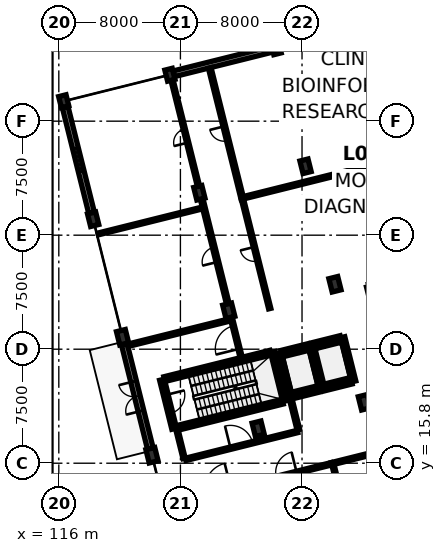
"""IFC4 building model, lengths in metres.
Left out: names, types, materials, properties, quantities, classifications, styles, units other than length and angle.
Written with IfcOpenShell. Run it as: python <this file> out.ifc"""

import sys

from ifc_helpers import new_model, si_unit, direction, frame, frame_2d, origin, origin_2d, place, context, subcontext, project, spatial, rectangle, extrude, element, fill, save


model = new_model("IFC4")
c1 = context("Model", 3, precision=1e-05, world=origin(), true_north=direction((0.0, 1.0)))
c2 = subcontext(c1, "Body", "Model", "MODEL_VIEW")
j1 = project(units=[si_unit("LENGTHUNIT", "METRE"), si_unit("PLANEANGLEUNIT", "RADIAN")], contexts=[c1])
p1 = place(None, origin())
s1 = spatial("IfcSite", under=j1, at=p1, CompositionType="ELEMENT")
p2 = place(p1, origin())
s2 = spatial("IfcBuilding", under=s1, at=p2, CompositionType="ELEMENT")
p3 = place(p2, origin())
s3 = spatial("IfcBuildingStorey", under=s2, at=p3, CompositionType="ELEMENT", Elevation=0.0)
for number, where, z_axis, x_axis in (
    (1, (122.129, 16.325, 0.0), (0.0, 0.0, 1.0), (0.97, 0.242, 0.0)),
    (2, (120.194, 24.087, 0.0), (0.0, 0.0, 1.0), (0.97, 0.242, 0.0)),
):
    element("IfcColumn", number, at=place(p3, frame(where, z_axis=z_axis, x_axis=x_axis)), inside=s3, PredefinedType="COLUMN", context=c2, shape_type="SweptSolid", body=[
        extrude(rectangle(XDim=0.6, YDim=0.9, at=origin_2d()), origin(), (0.0, 0.0, 1.0), 4.7),
    ])
p4 = place(p3, frame((118.259, 31.849, 0.0), z_axis=(0.0, 0.0, 1.0), x_axis=(0.970295726276, 0.2419218956, 0.0)))
e3 = element("IfcColumn", 3, at=p4, inside=s3, PredefinedType="COLUMN", context=c2, shape_type="SweptSolid", body=[
    extrude(rectangle(XDim=0.55, YDim=0.85, at=origin_2d()), origin(), (0.0, 0.0, 1.0), 4.7),
])
p5 = place(p3, frame((116.323, 39.612, 0.0), z_axis=(0.0, 0.0, 1.0), x_axis=(0.970295726276, 0.2419218956, 0.0)))
e4 = element("IfcColumn", 4, at=p5, inside=s3, PredefinedType="COLUMN", context=c2, shape_type="SweptSolid", body=[
    extrude(rectangle(XDim=0.5, YDim=0.75, at=origin_2d()), origin(), (0.0, 0.0, 1.0), 4.7),
])
for number, where, z_axis, x_axis in (
    (5, (129.115, 18.067, 0.0), (0.0, 0.0, 1.0), (0.97, 0.242, 0.0)),
    (6, (127.18, 25.829, 0.0), (0.0, 0.0, 1.0), (0.97, 0.242, 0.0)),
):
    element("IfcColumn", number, at=place(p3, frame(where, z_axis=z_axis, x_axis=x_axis)), inside=s3, PredefinedType="COLUMN", context=c2, shape_type="SweptSolid", body=[
        extrude(rectangle(XDim=0.6, YDim=0.9, at=origin_2d()), origin(), (0.0, 0.0, 1.0), 4.7),
    ])
p6 = place(p3, frame((125.245, 33.591, 0.0), z_axis=(0.0, 0.0, 1.0), x_axis=(0.970295726276, 0.2419218956, 0.0)))
e7 = element("IfcColumn", 7, at=p6, inside=s3, PredefinedType="COLUMN", context=c2, shape_type="SweptSolid", body=[
    extrude(rectangle(XDim=0.55, YDim=0.85, at=origin_2d()), origin(), (0.0, 0.0, 1.0), 4.7),
])
p7 = place(p3, frame((123.309, 41.354, 0.0), z_axis=(0.0, 0.0, 1.0), x_axis=(0.970295726276, 0.2419218956, 0.0)))
e8 = element("IfcColumn", 8, at=p7, inside=s3, PredefinedType="COLUMN", context=c2, shape_type="SweptSolid", body=[
    extrude(rectangle(XDim=0.5, YDim=0.75, at=origin_2d()), origin(), (0.0, 0.0, 1.0), 4.7),
])
for number, where, z_axis, x_axis in (
    (9, (136.102, 19.808, 0.0), (0.0, 0.0, 1.0), (0.97, 0.242, 0.0)),
    (10, (134.166, 27.571, 0.0), (0.0, 0.0, 1.0), (0.97, 0.242, 0.0)),
):
    element("IfcColumn", number, at=place(p3, frame(where, z_axis=z_axis, x_axis=x_axis)), inside=s3, PredefinedType="COLUMN", context=c2, shape_type="SweptSolid", body=[
        extrude(rectangle(XDim=0.6, YDim=0.9, at=origin_2d()), origin(), (0.0, 0.0, 1.0), 4.7),
    ])
p8 = place(p3, frame((132.231, 35.333, 0.0), z_axis=(0.0, 0.0, 1.0), x_axis=(0.970295726276, 0.2419218956, 0.0)))
e11 = element("IfcColumn", 11, at=p8, inside=s3, PredefinedType="COLUMN", context=c2, shape_type="SweptSolid", body=[
    extrude(rectangle(XDim=0.55, YDim=0.85, at=origin_2d()), origin(), (0.0, 0.0, 1.0), 4.7),
])
p9 = place(p3, frame((130.295, 43.095, 0.0), z_axis=(0.0, 0.0, 1.0), x_axis=(0.970295726276, 0.2419218956, 0.0)))
e12 = element("IfcColumn", 12, at=p9, inside=s3, PredefinedType="COLUMN", context=c2, shape_type="SweptSolid", body=[
    extrude(rectangle(XDim=0.5, YDim=0.75, at=origin_2d()), origin(), (0.0, 0.0, 1.0), 4.7),
])
p10 = place(p3, frame((122.02, 16.761, 0.0), z_axis=(0.0, 0.0, 1.0), x_axis=(-0.241912563448, 0.970298052995, 0.0)))
e13 = element("IfcWall", 13, at=p10, inside=s3, PredefinedType="SOLIDWALL", context=c2, shape_type="SweptSolid", body=[
    extrude(rectangle(XDim=7.1, YDim=0.38, at=frame_2d((3.55, 0.0))), origin(), (0.0, 0.0, 1.0), 3.985),
])
p11 = place(p10, frame((2.55, 0.0, 0.0)))
e14 = element("IfcOpeningElement", 14, at=p11, cuts=e13, PredefinedType="OPENING", context=c2, shape_type="SweptSolid", body=[
    extrude(rectangle(XDim=2.0, YDim=2.35, at=frame_2d((1.0, 1.175))), frame((0.0, 0.202, 0.0), z_axis=(0.0, -1.0, 0.0), x_axis=(1.0, 0.0, 0.0)), (0.0, 0.0, 1.0), 0.404),
])
p12 = place(p3, frame((118.156, 32.262, 0.0), z_axis=(0.0, 0.0, 1.0), x_axis=(-0.241929233735, 0.970293896644, 0.0)))
e15 = element("IfcWall", 15, at=p12, inside=s3, PredefinedType="SOLIDWALL", context=c2, shape_type="SweptSolid", body=[
    extrude(rectangle(XDim=7.2, YDim=0.38, at=frame_2d((3.6, 0.0))), origin(), (0.0, 0.0, 1.0), 3.985),
])
p13 = place(p12, frame((2.8, 0.0, 0.9)))
e16 = element("IfcOpeningElement", 16, at=p13, cuts=e15, PredefinedType="OPENING", context=c2, shape_type="SweptSolid", body=[
    extrude(rectangle(XDim=1.6, YDim=1.3, at=frame_2d((0.8, 0.65))), frame((0.0, 0.202, 0.0), z_axis=(0.0, -1.0, 0.0), x_axis=(1.0, 0.0, 0.0)), (0.0, 0.0, 1.0), 0.404),
])
p14 = place(p3, frame((123.552, 41.414, 0.0), z_axis=(0.0, 0.0, 1.0), x_axis=(0.970296633454, 0.241918257079, 0.0)))
e17 = element("IfcWall", 17, at=p14, inside=s3, PredefinedType="SOLIDWALL", context=c2, shape_type="SweptSolid", body=[
    extrude(rectangle(XDim=6.7, YDim=0.38, at=frame_2d((3.35, 0.0))), origin(), (0.0, 0.0, 1.0), 3.885),
])
p15 = place(p3, frame((123.75, 18.11, 0.0), z_axis=(0.0, 0.0, 1.0), x_axis=(0.970294108333, 0.241928384724, 0.0)))
e18 = element("IfcWall", 18, at=p15, inside=s3, PredefinedType="SHEAR", context=c2, shape_type="SweptSolid", body=[
    extrude(rectangle(XDim=7.19, YDim=0.32, at=frame_2d((3.595, 0.0))), origin(), (0.0, 0.0, 1.0), 4.7),
])
p16 = place(p3, frame((130.887, 19.889, 0.0), z_axis=(0.0, 0.0, 1.0), x_axis=(-0.241947258837, 0.970289402158, 0.0)))
e19 = element("IfcWall", 19, at=p16, inside=s3, PredefinedType="SHEAR", context=c2, shape_type="SweptSolid", body=[
    extrude(rectangle(XDim=3.32, YDim=0.32, at=frame_2d((1.66, 0.0))), origin(), (0.0, 0.0, 1.0), 4.7),
])
p17 = place(p3, frame((129.924, 23.071, 0.0), z_axis=(0.0, 0.0, 1.0), x_axis=(-0.970294108333, -0.241928384724, 0.0)))
e20 = element("IfcWall", 20, at=p17, inside=s3, PredefinedType="SHEAR", context=c2, shape_type="SweptSolid", body=[
    extrude(rectangle(XDim=7.19, YDim=0.32, at=frame_2d((3.595, 0.0))), origin(), (0.0, 0.0, 1.0), 4.7),
])
p18 = place(p3, frame((122.787, 21.292, 0.0), z_axis=(0.0, 0.0, 1.0), x_axis=(0.241860763027, -0.970310966293, 0.0)))
e21 = element("IfcWall", 21, at=p18, inside=s3, PredefinedType="SHEAR", context=c2, shape_type="SweptSolid", body=[
    extrude(rectangle(XDim=3.32, YDim=0.32, at=frame_2d((1.66, 0.0))), origin(), (0.0, 0.0, 1.0), 4.7),
])
p19 = place(p18, frame((1.035, 0.0, 0.0)))
e22 = element("IfcOpeningElement", 22, at=p19, cuts=e21, PredefinedType="OPENING", context=c2, shape_type="SweptSolid", body=[
    extrude(rectangle(XDim=1.25, YDim=2.2, at=frame_2d((0.625, 1.1))), frame((0.0, 0.172, 0.0), z_axis=(0.0, -1.0, 0.0), x_axis=(1.0, 0.0, 0.0)), (0.0, 0.0, 1.0), 0.344),
])
p20 = place(p3, frame((131.363, 20.176, 0.0), z_axis=(0.0, 0.0, 1.0), x_axis=(0.970284587517, 0.241966566341, 0.0)))
e23 = element("IfcWall", 23, at=p20, inside=s3, PredefinedType="SHEAR", context=c2, shape_type="SweptSolid", body=[
    extrude(rectangle(XDim=1.817, YDim=0.28, at=frame_2d((0.909, 0.0))), origin(), (0.0, 0.0, 1.0), 4.7),
])
p21 = place(p3, frame((133.267, 20.651, 0.0), z_axis=(0.0, 0.0, 1.0), x_axis=(-0.241921647353, 0.970295788171, 0.0)))
e24 = element("IfcWall", 24, at=p21, inside=s3, PredefinedType="SHEAR", context=c2, shape_type="SweptSolid", body=[
    extrude(rectangle(XDim=2.994, YDim=0.28, at=frame_2d((1.497, 0.0))), origin(), (0.0, 0.0, 1.0), 4.7),
])
p22 = place(p3, frame((132.402, 23.521, 0.0), z_axis=(0.0, 0.0, 1.0), x_axis=(-0.970284587517, -0.241966566341, 0.0)))
e25 = element("IfcWall", 25, at=p22, inside=s3, PredefinedType="SHEAR", context=c2, shape_type="SweptSolid", body=[
    extrude(rectangle(XDim=1.817, YDim=0.28, at=frame_2d((0.909, 0.0))), origin(), (0.0, 0.0, 1.0), 4.7),
])
p23 = place(p22, frame((0.259, 0.0, 0.0)))
e26 = element("IfcOpeningElement", 26, at=p23, cuts=e25, PredefinedType="OPENING", context=c2, shape_type="SweptSolid", body=[
    extrude(rectangle(XDim=1.3, YDim=2.2, at=frame_2d((0.65, 1.1))), frame((0.0, 0.152, 0.0), z_axis=(0.0, -1.0, 0.0), x_axis=(1.0, 0.0, 0.0)), (0.0, 0.0, 1.0), 0.304),
])
p24 = place(p3, frame((130.498, 23.046, 0.0), z_axis=(0.0, 0.0, 1.0), x_axis=(0.241921647353, -0.970295788171, 0.0)))
e27 = element("IfcWall", 27, at=p24, inside=s3, PredefinedType="SHEAR", context=c2, shape_type="SweptSolid", body=[
    extrude(rectangle(XDim=2.994, YDim=0.28, at=frame_2d((1.497, 0.0))), origin(), (0.0, 0.0, 1.0), 4.7),
])
p25 = place(p3, frame((133.408, 20.686, 0.0), z_axis=(0.0, 0.0, 1.0), x_axis=(0.970285190026, 0.241964150272, 0.0)))
e28 = element("IfcWall", 28, at=p25, inside=s3, PredefinedType="SHEAR", context=c2, shape_type="SweptSolid", body=[
    extrude(rectangle(XDim=1.91, YDim=0.28, at=frame_2d((0.955, 0.0))), origin(), (0.0, 0.0, 1.0), 4.7),
])
p26 = place(p3, frame((135.402, 21.183, 0.0), z_axis=(0.0, 0.0, 1.0), x_axis=(-0.241921647353, 0.970295788171, 0.0)))
e29 = element("IfcWall", 29, at=p26, inside=s3, PredefinedType="SHEAR", context=c2, shape_type="SweptSolid", body=[
    extrude(rectangle(XDim=2.994, YDim=0.28, at=frame_2d((1.497, 0.0))), origin(), (0.0, 0.0, 1.0), 4.7),
])
p27 = place(p3, frame((134.537, 24.053, 0.0), z_axis=(0.0, 0.0, 1.0), x_axis=(-0.970285190026, -0.241964150272, 0.0)))
e30 = element("IfcWall", 30, at=p27, inside=s3, PredefinedType="SHEAR", context=c2, shape_type="SweptSolid", body=[
    extrude(rectangle(XDim=1.91, YDim=0.28, at=frame_2d((0.955, 0.0))), origin(), (0.0, 0.0, 1.0), 4.7),
])
p28 = place(p27, frame((0.305, 0.0, 0.0)))
e31 = element("IfcOpeningElement", 31, at=p28, cuts=e30, PredefinedType="OPENING", context=c2, shape_type="SweptSolid", body=[
    extrude(rectangle(XDim=1.3, YDim=2.2, at=frame_2d((0.65, 1.1))), frame((0.0, 0.152, 0.0), z_axis=(0.0, -1.0, 0.0), x_axis=(1.0, 0.0, 0.0)), (0.0, 0.0, 1.0), 0.304),
])
p29 = place(p3, frame((124.346, 16.053, 0.0), z_axis=(0.0, 0.0, 1.0), x_axis=(0.970295772287, 0.241921711059, 0.0)))
e32 = element("IfcWall", 32, at=p29, inside=s3, PredefinedType="PARTITIONING", context=c2, shape_type="SweptSolid", body=[
    extrude(rectangle(XDim=7.58, YDim=0.16, at=frame_2d((3.79, 0.0))), origin(), (0.0, 0.0, 1.0), 3.885),
])
p30 = place(p29, frame((3.04, 0.0, 0.0)))
e33 = element("IfcOpeningElement", 33, at=p30, cuts=e32, PredefinedType="OPENING", context=c2, shape_type="SweptSolid", body=[
    extrude(rectangle(XDim=1.5, YDim=2.28, at=frame_2d((0.75, 1.14))), frame((0.0, 0.092, 0.0), z_axis=(0.0, -1.0, 0.0), x_axis=(1.0, 0.0, 0.0)), (0.0, 0.0, 1.0), 0.184),
])
p31 = place(p3, frame((127.995, 22.767, 0.0), z_axis=(0.0, 0.0, 1.0), x_axis=(-0.241877500256, 0.9703067942, 0.0)))
e34 = element("IfcWall", 34, at=p31, inside=s3, PredefinedType="PARTITIONING", context=c2, shape_type="SweptSolid", body=[
    extrude(rectangle(XDim=2.706, YDim=0.15, at=frame_2d((1.353, 0.0))), origin(), (0.0, 0.0, 1.0), 4.7),
])
p32 = place(p31, frame((0.573, 0.0, 0.0)))
e35 = element("IfcOpeningElement", 35, at=p32, cuts=e34, PredefinedType="OPENING", context=c2, shape_type="SweptSolid", body=[
    extrude(rectangle(XDim=1.56, YDim=2.3, at=frame_2d((0.78, 1.15))), frame((0.0, 0.087, 0.0), z_axis=(0.0, -1.0, 0.0), x_axis=(1.0, 0.0, 0.0)), (0.0, 0.0, 1.0), 0.174),
])
p33 = place(p3, frame((128.023, 14.29, 0.0), z_axis=(0.0, 0.0, 1.0), x_axis=(0.970293282145, 0.241931698263, 0.0)))
e36 = element("IfcWall", 36, at=p33, inside=s3, PredefinedType="PARTITIONING", context=c2, shape_type="SweptSolid", body=[
    extrude(rectangle(XDim=6.088, YDim=0.16, at=frame_2d((3.044, 0.0))), origin(), (0.0, 0.0, 1.0), 3.885),
])
p34 = place(p33, frame((2.354, 0.0, 0.0)))
e37 = element("IfcOpeningElement", 37, at=p34, cuts=e36, PredefinedType="OPENING", context=c2, shape_type="SweptSolid", body=[
    extrude(rectangle(XDim=1.38, YDim=2.3, at=frame_2d((0.69, 1.15))), frame((0.0, 0.092, 0.0), z_axis=(0.0, -1.0, 0.0), x_axis=(1.0, 0.0, 0.0)), (0.0, 0.0, 1.0), 0.184),
])
p35 = place(p3, frame((133.942, 15.766, 0.0), z_axis=(0.0, 0.0, 1.0), x_axis=(0.970292162734, 0.241936187739, 0.0)))
e38 = element("IfcWall", 38, at=p35, inside=s3, PredefinedType="PARTITIONING", context=c2, shape_type="SweptSolid", body=[
    extrude(rectangle(XDim=7.188, YDim=0.16, at=frame_2d((3.594, 0.0))), origin(), (0.0, 0.0, 1.0), 3.885),
])
p36 = place(p35, frame((2.874, 0.0, 0.0)))
e39 = element("IfcOpeningElement", 39, at=p36, cuts=e38, PredefinedType="OPENING", context=c2, shape_type="SweptSolid", body=[
    extrude(rectangle(XDim=1.44, YDim=2.32, at=frame_2d((0.72, 1.16))), frame((0.0, 0.092, 0.0), z_axis=(0.0, -1.0, 0.0), x_axis=(1.0, 0.0, 0.0)), (0.0, 0.0, 1.0), 0.184),
])
p37 = place(p3, frame((127.221, 25.87, 0.0), z_axis=(0.0, 0.0, 1.0), x_axis=(-0.241902639837, 0.970300527074, 0.0)))
e40 = element("IfcWall", 40, at=p37, inside=s3, PredefinedType="PARTITIONING", context=c2, shape_type="SweptSolid", body=[
    extrude(rectangle(XDim=7.533, YDim=0.18, at=frame_2d((3.767, 0.0))), origin(), (0.0, 0.0, 1.0), 3.885),
])
p38 = place(p37, frame((3.267, 0.0, 0.0)))
e41 = element("IfcOpeningElement", 41, at=p38, cuts=e40, PredefinedType="OPENING", context=c2, shape_type="SweptSolid", body=[
    extrude(rectangle(XDim=1.0, YDim=2.22, at=frame_2d((0.5, 1.11))), frame((0.0, 0.102, 0.0), z_axis=(0.0, -1.0, 0.0), x_axis=(1.0, 0.0, 0.0)), (0.0, 0.0, 1.0), 0.204),
])
p39 = place(p3, frame((129.876, 25.97, 0.0), z_axis=(0.0, 0.0, 1.0), x_axis=(-0.241938716353, 0.970291532236, 0.0)))
e42 = element("IfcWall", 42, at=p39, inside=s3, PredefinedType="PARTITIONING", context=c2, shape_type="SweptSolid", body=[
    extrude(rectangle(XDim=7.411, YDim=0.15, at=frame_2d((3.706, 0.0))), origin(), (0.0, 0.0, 1.0), 3.985),
])
p40 = place(p39, frame((3.23, 0.0, 0.0)))
e43 = element("IfcOpeningElement", 43, at=p40, cuts=e42, PredefinedType="OPENING", context=c2, shape_type="SweptSolid", body=[
    extrude(rectangle(XDim=0.95, YDim=2.15, at=frame_2d((0.475, 1.075))), frame((0.0, 0.087, 0.0), z_axis=(0.0, -1.0, 0.0), x_axis=(1.0, 0.0, 0.0)), (0.0, 0.0, 1.0), 0.174),
])
p41 = place(p3, frame((125.28, 33.657, 0.0), z_axis=(0.0, 0.0, 1.0), x_axis=(-0.241913572398, 0.970297801445, 0.0)))
e44 = element("IfcWall", 44, at=p41, inside=s3, PredefinedType="PARTITIONING", context=c2, shape_type="SweptSolid", body=[
    extrude(rectangle(XDim=7.573, YDim=0.15, at=frame_2d((3.787, 0.0))), origin(), (0.0, 0.0, 1.0), 3.885),
])
p42 = place(p41, frame((3.326, 0.0, 0.0)))
e45 = element("IfcOpeningElement", 45, at=p42, cuts=e44, PredefinedType="OPENING", context=c2, shape_type="SweptSolid", body=[
    extrude(rectangle(XDim=0.92, YDim=2.1, at=frame_2d((0.46, 1.05))), frame((0.0, 0.087, 0.0), z_axis=(0.0, -1.0, 0.0), x_axis=(1.0, 0.0, 0.0)), (0.0, 0.0, 1.0), 0.174),
])
p43 = place(p3, frame((128.08, 33.173, 0.0), z_axis=(0.0, 0.0, 1.0), x_axis=(-0.241908804898, 0.970298990061, 0.0)))
e46 = element("IfcWall", 46, at=p43, inside=s3, PredefinedType="PARTITIONING", context=c2, shape_type="SweptSolid", body=[
    extrude(rectangle(XDim=8.89, YDim=0.18, at=frame_2d((4.445, 0.0))), origin(), (0.0, 0.0, 1.0), 3.985),
])
p44 = place(p43, frame((3.955, 0.0, 0.0)))
e47 = element("IfcOpeningElement", 47, at=p44, cuts=e46, PredefinedType="OPENING", context=c2, shape_type="SweptSolid", body=[
    extrude(rectangle(XDim=0.98, YDim=2.12, at=frame_2d((0.49, 1.06))), frame((0.0, 0.102, 0.0), z_axis=(0.0, -1.0, 0.0), x_axis=(1.0, 0.0, 0.0)), (0.0, 0.0, 1.0), 0.204),
])
p45 = place(p3, frame((124.243, 16.115, 0.0), z_axis=(0.0, 0.0, 1.0), x_axis=(-0.24202255973, 0.970270622343, 0.0)))
e48 = element("IfcWall", 48, at=p45, inside=s3, PredefinedType="PARTITIONING", context=c2, shape_type="SweptSolid", body=[
    extrude(rectangle(XDim=1.792, YDim=0.15, at=frame_2d((0.896, 0.0))), origin(), (0.0, 0.0, 1.0), 3.985),
])
p46 = place(p3, frame((131.763, 17.99, 0.0), z_axis=(0.0, 0.0, 1.0), x_axis=(-0.241962612769, 0.970285573438, 0.0)))
e49 = element("IfcWall", 49, at=p46, inside=s3, PredefinedType="PARTITIONING", context=c2, shape_type="SweptSolid", body=[
    extrude(rectangle(XDim=2.206, YDim=0.18, at=frame_2d((1.103, 0.0))), origin(), (0.0, 0.0, 1.0), 3.985),
])
p47 = place(p3, frame((120.535, 23.554, 0.0), z_axis=(0.0, 0.0, 1.0), x_axis=(0.970294973208, 0.241924915969, 0.0)))
e50 = element("IfcWall", 50, at=p47, inside=s3, PredefinedType="PARTITIONING", context=c2, shape_type="SweptSolid", body=[
    extrude(rectangle(XDim=6.961, YDim=0.16, at=frame_2d((3.48, 0.0))), origin(), (0.0, 0.0, 1.0), 3.985),
])
p48 = place(p3, frame((135.737, 8.87, 0.0), z_axis=(0.0, 0.0, 1.0), x_axis=(-0.241939357675, 0.970291372325, 0.0)))
e51 = element("IfcWall", 51, at=p48, inside=s3, PredefinedType="PARTITIONING", context=c2, shape_type="SweptSolid", body=[
    extrude(rectangle(XDim=7.033, YDim=0.15, at=frame_2d((3.517, 0.0))), origin(), (0.0, 0.0, 1.0), 3.985),
])
p49 = place(p3, frame((138.264, 19.611, 0.0), z_axis=(0.0, 0.0, 1.0), x_axis=(-0.241920353256, 0.970296110824, 0.0)))
e52 = element("IfcWall", 52, at=p49, inside=s3, PredefinedType="PARTITIONING", context=c2, shape_type="SweptSolid", body=[
    extrude(rectangle(XDim=8.03, YDim=0.16, at=frame_2d((4.015, 0.0))), origin(), (0.0, 0.0, 1.0), 3.985),
])
p50 = place(p3, frame((118.604, 30.885, 0.0), z_axis=(0.0, 0.0, 1.0), x_axis=(0.970295173711, 0.241924111804, 0.0)))
e53 = element("IfcWall", 53, at=p50, inside=s3, PredefinedType="PARTITIONING", context=c2, shape_type="SweptSolid", body=[
    extrude(rectangle(XDim=7.046, YDim=0.125, at=frame_2d((3.523, 0.0))), origin(), (0.0, 0.0, 1.0), 3.885),
])
p51 = place(p3, frame((128.161, 33.268, 0.0), z_axis=(0.0, 0.0, 1.0), x_axis=(0.970294807235, 0.241925581644, 0.0)))
e54 = element("IfcWall", 54, at=p51, inside=s3, PredefinedType="PARTITIONING", context=c2, shape_type="SweptSolid", body=[
    extrude(rectangle(XDim=18.646, YDim=0.16, at=frame_2d((9.323, 0.0))), origin(), (0.0, 0.0, 1.0), 3.885),
])
p52 = place(p11, origin())
e55 = element("IfcDoor", 55, at=p52, inside=s3, OperationType="DOUBLE_DOOR_SINGLE_SWING", PredefinedType="DOOR", context=c2, shape_type="SweptSolid", body=[
    extrude(rectangle(XDim=2.0, YDim=2.35, at=frame_2d((1.0, 1.175))), frame((0.0, 0.025, 0.0), z_axis=(0.0, -1.0, 0.0), x_axis=(1.0, 0.0, 0.0)), (0.0, 0.0, 1.0), 0.05),
])
fill(e14, e55)
p53 = place(p13, origin())
e56 = element("IfcWindow", 56, at=p53, inside=s3, PartitioningType="DOUBLE_PANEL_VERTICAL", PredefinedType="WINDOW", context=c2, shape_type="SweptSolid", body=[
    extrude(rectangle(XDim=1.6, YDim=1.3, at=frame_2d((0.8, 0.65))), frame((0.0, 0.03, 0.0), z_axis=(0.0, -1.0, 0.0), x_axis=(1.0, 0.0, 0.0)), (0.0, 0.0, 1.0), 0.06),
])
fill(e16, e56)
p54 = place(p19, origin())
e57 = element("IfcDoor", 57, at=p54, inside=s3, OperationType="SINGLE_SWING_LEFT", PredefinedType="DOOR", context=c2, shape_type="SweptSolid", body=[
    extrude(rectangle(XDim=1.25, YDim=2.2, at=frame_2d((0.625, 1.1))), frame((0.0, 0.025, 0.0), z_axis=(0.0, -1.0, 0.0), x_axis=(1.0, 0.0, 0.0)), (0.0, 0.0, 1.0), 0.05),
])
fill(e22, e57)
p55 = place(p23, origin())
e58 = element("IfcDoor", 58, at=p55, inside=s3, OperationType="SLIDING_TO_LEFT", PredefinedType="DOOR", context=c2, shape_type="SweptSolid", body=[
    extrude(rectangle(XDim=1.3, YDim=2.2, at=frame_2d((0.65, 1.1))), frame((0.0, 0.025, 0.0), z_axis=(0.0, -1.0, 0.0), x_axis=(1.0, 0.0, 0.0)), (0.0, 0.0, 1.0), 0.05),
])
fill(e26, e58)
p56 = place(p28, origin())
e59 = element("IfcDoor", 59, at=p56, inside=s3, OperationType="SLIDING_TO_RIGHT", PredefinedType="DOOR", context=c2, shape_type="SweptSolid", body=[
    extrude(rectangle(XDim=1.3, YDim=2.2, at=frame_2d((0.65, 1.1))), frame((0.0, 0.025, 0.0), z_axis=(0.0, -1.0, 0.0), x_axis=(1.0, 0.0, 0.0)), (0.0, 0.0, 1.0), 0.05),
])
fill(e31, e59)
p57 = place(p30, origin())
e60 = element("IfcDoor", 60, at=p57, inside=s3, OperationType="SINGLE_SWING_LEFT", PredefinedType="DOOR", context=c2, shape_type="SweptSolid", body=[
    extrude(rectangle(XDim=1.5, YDim=2.28, at=frame_2d((0.75, 1.14))), frame((0.0, 0.025, 0.0), z_axis=(0.0, -1.0, 0.0), x_axis=(1.0, 0.0, 0.0)), (0.0, 0.0, 1.0), 0.05),
])
fill(e33, e60)
p58 = place(p32, origin())
e61 = element("IfcDoor", 61, at=p58, inside=s3, OperationType="SINGLE_SWING_LEFT", PredefinedType="DOOR", context=c2, shape_type="SweptSolid", body=[
    extrude(rectangle(XDim=1.56, YDim=2.3, at=frame_2d((0.78, 1.15))), frame((0.0, 0.025, 0.0), z_axis=(0.0, -1.0, 0.0), x_axis=(1.0, 0.0, 0.0)), (0.0, 0.0, 1.0), 0.05),
])
fill(e35, e61)
p59 = place(p34, origin())
e62 = element("IfcDoor", 62, at=p59, inside=s3, OperationType="SINGLE_SWING_RIGHT", PredefinedType="DOOR", context=c2, shape_type="SweptSolid", body=[
    extrude(rectangle(XDim=1.38, YDim=2.3, at=frame_2d((0.69, 1.15))), frame((0.0, 0.025, 0.0), z_axis=(0.0, -1.0, 0.0), x_axis=(1.0, 0.0, 0.0)), (0.0, 0.0, 1.0), 0.05),
])
fill(e37, e62)
p60 = place(p38, origin())
e63 = element("IfcDoor", 63, at=p60, inside=s3, OperationType="SINGLE_SWING_LEFT", PredefinedType="DOOR", context=c2, shape_type="SweptSolid", body=[
    extrude(rectangle(XDim=1.0, YDim=2.22, at=frame_2d((0.5, 1.11))), frame((0.0, 0.025, 0.0), z_axis=(0.0, -1.0, 0.0), x_axis=(1.0, 0.0, 0.0)), (0.0, 0.0, 1.0), 0.05),
])
fill(e41, e63)
p61 = place(p40, origin())
e64 = element("IfcDoor", 64, at=p61, inside=s3, OperationType="SINGLE_SWING_RIGHT", PredefinedType="DOOR", context=c2, shape_type="SweptSolid", body=[
    extrude(rectangle(XDim=0.95, YDim=2.15, at=frame_2d((0.475, 1.075))), frame((0.0, 0.025, 0.0), z_axis=(0.0, -1.0, 0.0), x_axis=(1.0, 0.0, 0.0)), (0.0, 0.0, 1.0), 0.05),
])
fill(e43, e64)
p62 = place(p42, origin())
e65 = element("IfcDoor", 65, at=p62, inside=s3, OperationType="SINGLE_SWING_LEFT", PredefinedType="DOOR", context=c2, shape_type="SweptSolid", body=[
    extrude(rectangle(XDim=0.92, YDim=2.1, at=frame_2d((0.46, 1.05))), frame((0.0, 0.025, 0.0), z_axis=(0.0, -1.0, 0.0), x_axis=(1.0, 0.0, 0.0)), (0.0, 0.0, 1.0), 0.05),
])
fill(e45, e65)
p63 = place(p44, origin())
e66 = element("IfcDoor", 66, at=p63, inside=s3, OperationType="SINGLE_SWING_RIGHT", PredefinedType="DOOR", context=c2, shape_type="SweptSolid", body=[
    extrude(rectangle(XDim=0.98, YDim=2.12, at=frame_2d((0.49, 1.06))), frame((0.0, 0.025, 0.0), z_axis=(0.0, -1.0, 0.0), x_axis=(1.0, 0.0, 0.0)), (0.0, 0.0, 1.0), 0.05),
])
fill(e47, e66)
save(model, sys.argv[1])
